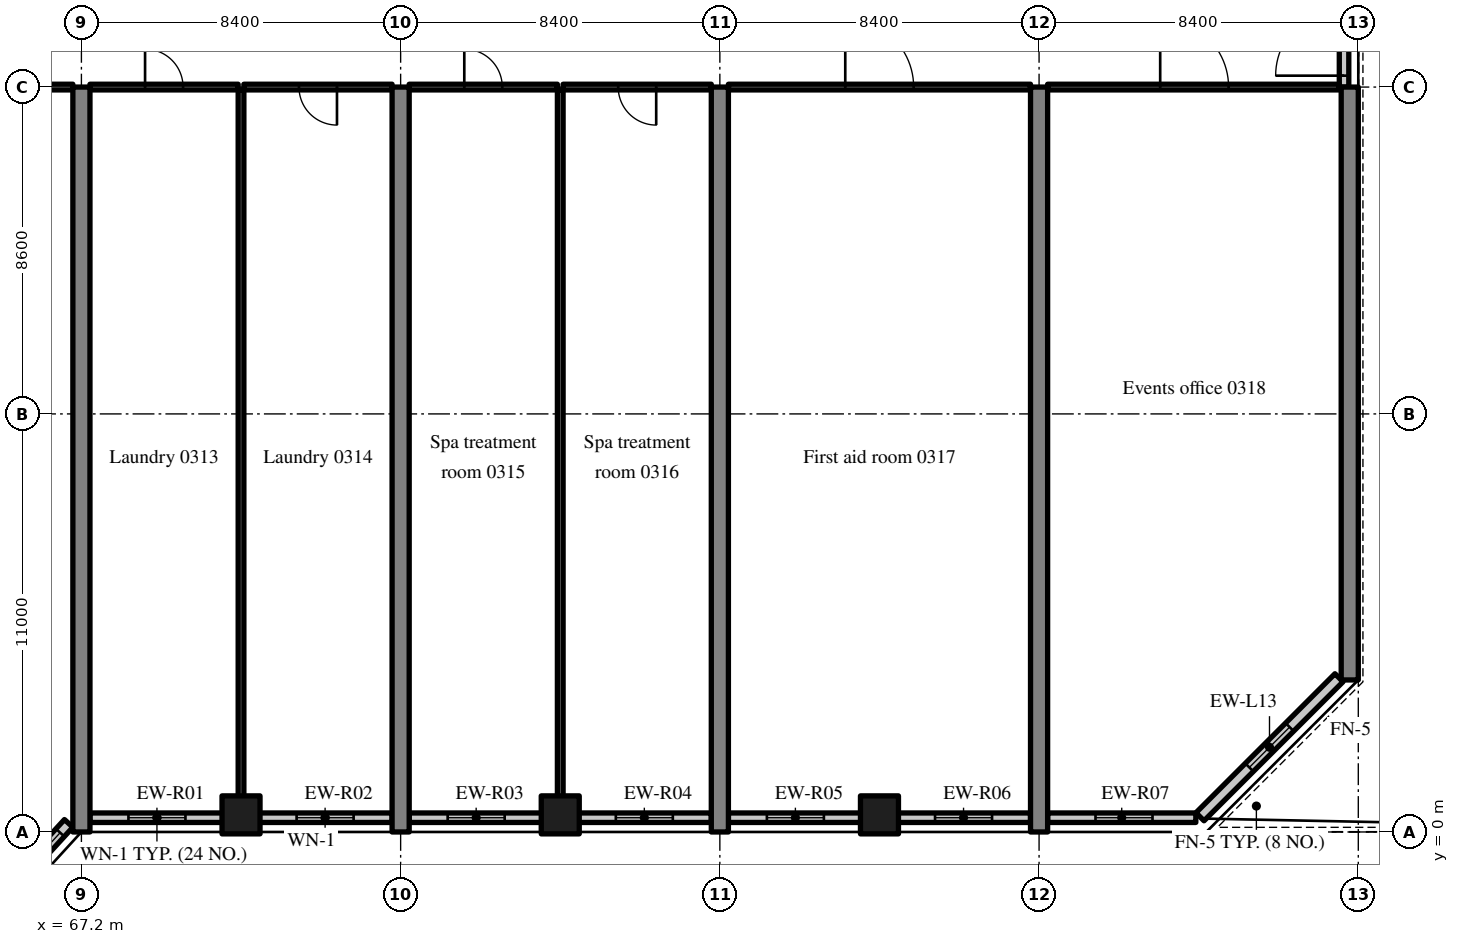
"""IFC4 building model, lengths in metres.
Left out: names, types, materials, properties, quantities, classifications, styles, units other than length and angle.
Written with IfcOpenShell. Run it as: python <this file> out.ifc"""

import sys

from ifc_helpers import new_model, si_unit, direction, frame, frame_2d, origin, origin_2d, place, context, subcontext, project, spatial, rectangle, extrude, source, transform, mapped, element, fill, save


model = new_model("IFC4")
c1 = context("Model", 3, precision=1e-05, world=origin(), true_north=direction((0.0, 1.0)))
c2 = subcontext(c1, "Body", "Model", "MODEL_VIEW")
j1 = project(units=[si_unit("LENGTHUNIT", "METRE"), si_unit("PLANEANGLEUNIT", "RADIAN")], contexts=[c1])
p1 = place(None, origin())
s1 = spatial("IfcSite", under=j1, at=p1, CompositionType="ELEMENT")
p2 = place(p1, origin())
s2 = spatial("IfcBuilding", under=s1, at=p2, CompositionType="ELEMENT")
p3 = place(p2, frame((0.0, 0.0, 18.0)))
s3 = spatial("IfcBuildingStorey", under=s2, at=p3, CompositionType="ELEMENT", Elevation=18.0)
m1 = source(origin(), c2, "Body", "SweptSolid", [
    extrude(rectangle(XDim=19.6, YDim=0.45, at=frame_2d((9.8, 0.0))), origin(), (0.0, 0.0, 1.0), 4.72),
])
for number, where, z_axis, x_axis in (
    (1, (67.2, 0.0, 0.0), (0.0, 0.0, 1.0), (0.0, 1.0, 0.0)),
    (2, (75.6, 0.0, 0.0), (0.0, 0.0, 1.0), (0.0, 1.0, 0.0)),
    (3, (84.0, 0.0, 0.0), (0.0, 0.0, 1.0), (0.0, 1.0, 0.0)),
    (4, (92.4, 0.0, 0.0), (0.0, 0.0, 1.0), (0.0, 1.0, 0.0)),
):
    element("IfcWall", number, at=place(p3, frame(where, z_axis=z_axis, x_axis=x_axis)), inside=s3, PredefinedType="SHEAR", context=c2, shape_type="MappedRepresentation", body=[
        mapped(m1, transform((0.0, 0.0, 0.0), scale=1.0)),
    ])
m2 = source(origin(), c2, "Body", "SweptSolid", [
    extrude(rectangle(XDim=15.6, YDim=0.45, at=frame_2d((7.8, 0.0))), origin(), (0.0, 0.0, 1.0), 4.72),
])
p4 = place(p3, frame((100.575, 4.0, 0.0), z_axis=(0.0, 0.0, 1.0), x_axis=(0.0, 1.0, 0.0)))
e5 = element("IfcWall", 5, at=p4, inside=s3, PredefinedType="SHEAR", context=c2, shape_type="MappedRepresentation", body=[
    mapped(m2, transform((0.0, 0.0, 0.0), scale=1.0)),
])
m3 = source(origin(), c2, "Body", "SweptSolid", [
    extrude(rectangle(XDim=1.0, YDim=1.0, at=origin_2d()), origin(), (0.0, 0.0, 1.0), 4.72),
])
for number, where, z_axis, x_axis in (
    (6, (71.4, 0.45, 0.0), (0.0, 0.0, 1.0), (1.0, 0.0, 0.0)),
    (7, (79.8, 0.45, 0.0), (0.0, 0.0, 1.0), (1.0, 0.0, 0.0)),
    (8, (88.2, 0.45, 0.0), (0.0, 0.0, 1.0), (1.0, 0.0, 0.0)),
):
    element("IfcColumn", number, at=place(p3, frame(where, z_axis=z_axis, x_axis=x_axis)), inside=s3, PredefinedType="COLUMN", context=c2, shape_type="MappedRepresentation", body=[
        mapped(m3, transform((0.0, 0.0, 0.0), scale=1.0)),
    ])
m4 = source(origin(), c2, "Body", "SweptSolid", [
    extrude(rectangle(XDim=2.162, YDim=0.3, at=frame_2d((1.081, 0.0))), origin(), (0.0, 0.0, 1.0), 4.72),
])
p5 = place(p3, frame((65.404, -1.369, 0.0), z_axis=(0.0, 0.0, 1.0), x_axis=(0.67537173084, 0.737477474355, 0.0)))
e9 = element("IfcWall", 9, at=p5, inside=s3, PredefinedType="SOLIDWALL", context=c2, shape_type="MappedRepresentation", body=[
    mapped(m4, transform((0.0, 0.0, 0.0), scale=1.0)),
])
m5 = source(origin(), c2, "Body", "SweptSolid", [
    extrude(rectangle(XDim=1.5, YDim=2.0, at=frame_2d((0.75, 1.0))), frame((0.0, 0.16, 0.0), z_axis=(0.0, -1.0, 0.0), x_axis=(1.0, 0.0, 0.0)), (0.0, 0.0, 1.0), 0.32),
])
p6 = place(p5, frame((0.331, 0.0, 0.9)))
e10 = element("IfcOpeningElement", 10, at=p6, cuts=e9, PredefinedType="OPENING", context=c2, shape_type="MappedRepresentation", body=[
    mapped(m5, transform((0.0, 0.0, 0.0), scale=1.0)),
])
m6 = source(origin(), c2, "Body", "SweptSolid", [
    extrude(rectangle(XDim=3.525, YDim=0.25, at=frame_2d((1.762, 0.0))), origin(), (0.0, 0.0, 1.0), 3.97),
])
p7 = place(p3, frame((67.425, 0.375, 0.0), z_axis=(0.0, 0.0, 1.0), x_axis=(1.0, 0.0, 0.0)))
e11 = element("IfcWall", 11, at=p7, inside=s3, PredefinedType="SOLIDWALL", context=c2, shape_type="MappedRepresentation", body=[
    mapped(m6, transform((0.0, 0.0, 0.0), scale=1.0)),
])
m7 = source(origin(), c2, "Body", "SweptSolid", [
    extrude(rectangle(XDim=1.5, YDim=1.5, at=frame_2d((0.75, 0.75))), frame((0.0, 0.135, 0.0), z_axis=(0.0, -1.0, 0.0), x_axis=(1.0, 0.0, 0.0)), (0.0, 0.0, 1.0), 0.27),
])
p8 = place(p7, frame((1.012, 0.0, 0.9)))
e12 = element("IfcOpeningElement", 12, at=p8, cuts=e11, PredefinedType="OPENING", context=c2, shape_type="MappedRepresentation", body=[
    mapped(m7, transform((0.0, 0.0, 0.0), scale=1.0)),
])
p9 = place(p3, frame((71.85, 0.375, 0.0), z_axis=(0.0, 0.0, 1.0), x_axis=(1.0, 0.0, 0.0)))
e13 = element("IfcWall", 13, at=p9, inside=s3, PredefinedType="SOLIDWALL", context=c2, shape_type="MappedRepresentation", body=[
    mapped(m6, transform((0.0, 0.0, 0.0), scale=1.0)),
])
p10 = place(p9, frame((1.012, 0.0, 0.9)))
e14 = element("IfcOpeningElement", 14, at=p10, cuts=e13, PredefinedType="OPENING", context=c2, shape_type="MappedRepresentation", body=[
    mapped(m7, transform((0.0, 0.0, 0.0), scale=1.0)),
])
m8 = source(origin(), c2, "Body", "SweptSolid", [
    extrude(rectangle(XDim=3.525, YDim=0.25, at=frame_2d((1.763, 0.0))), origin(), (0.0, 0.0, 1.0), 3.97),
])
p11 = place(p3, frame((75.825, 0.375, 0.0), z_axis=(0.0, 0.0, 1.0), x_axis=(1.0, 0.0, 0.0)))
e15 = element("IfcWall", 15, at=p11, inside=s3, PredefinedType="SOLIDWALL", context=c2, shape_type="MappedRepresentation", body=[
    mapped(m8, transform((0.0, 0.0, 0.0), scale=1.0)),
])
p12 = place(p11, frame((1.012, 0.0, 0.9)))
e16 = element("IfcOpeningElement", 16, at=p12, cuts=e15, PredefinedType="OPENING", context=c2, shape_type="MappedRepresentation", body=[
    mapped(m7, transform((0.0, 0.0, 0.0), scale=1.0)),
])
p13 = place(p3, frame((80.25, 0.375, 0.0), z_axis=(0.0, 0.0, 1.0), x_axis=(1.0, 0.0, 0.0)))
e17 = element("IfcWall", 17, at=p13, inside=s3, PredefinedType="SOLIDWALL", context=c2, shape_type="MappedRepresentation", body=[
    mapped(m6, transform((0.0, 0.0, 0.0), scale=1.0)),
])
p14 = place(p13, frame((1.012, 0.0, 0.9)))
e18 = element("IfcOpeningElement", 18, at=p14, cuts=e17, PredefinedType="OPENING", context=c2, shape_type="MappedRepresentation", body=[
    mapped(m7, transform((0.0, 0.0, 0.0), scale=1.0)),
])
p15 = place(p3, frame((84.225, 0.375, 0.0), z_axis=(0.0, 0.0, 1.0), x_axis=(1.0, 0.0, 0.0)))
e19 = element("IfcWall", 19, at=p15, inside=s3, PredefinedType="SOLIDWALL", context=c2, shape_type="MappedRepresentation", body=[
    mapped(m6, transform((0.0, 0.0, 0.0), scale=1.0)),
])
p16 = place(p15, frame((1.012, 0.0, 0.9)))
e20 = element("IfcOpeningElement", 20, at=p16, cuts=e19, PredefinedType="OPENING", context=c2, shape_type="MappedRepresentation", body=[
    mapped(m7, transform((0.0, 0.0, 0.0), scale=1.0)),
])
p17 = place(p3, frame((88.65, 0.375, 0.0), z_axis=(0.0, 0.0, 1.0), x_axis=(1.0, 0.0, 0.0)))
e21 = element("IfcWall", 21, at=p17, inside=s3, PredefinedType="SOLIDWALL", context=c2, shape_type="MappedRepresentation", body=[
    mapped(m8, transform((0.0, 0.0, 0.0), scale=1.0)),
])
p18 = place(p17, frame((1.012, 0.0, 0.9)))
e22 = element("IfcOpeningElement", 22, at=p18, cuts=e21, PredefinedType="OPENING", context=c2, shape_type="MappedRepresentation", body=[
    mapped(m7, transform((0.0, 0.0, 0.0), scale=1.0)),
])
m9 = source(origin(), c2, "Body", "SweptSolid", [
    extrude(rectangle(XDim=3.9, YDim=0.25, at=frame_2d((1.95, 0.0))), origin(), (0.0, 0.0, 1.0), 3.97),
])
p19 = place(p3, frame((92.625, 0.375, 0.0), z_axis=(0.0, 0.0, 1.0), x_axis=(1.0, 0.0, 0.0)))
e23 = element("IfcWall", 23, at=p19, inside=s3, PredefinedType="SOLIDWALL", context=c2, shape_type="MappedRepresentation", body=[
    mapped(m9, transform((0.0, 0.0, 0.0), scale=1.0)),
])
p20 = place(p19, frame((1.26, 0.0, 0.9)))
e24 = element("IfcOpeningElement", 24, at=p20, cuts=e23, PredefinedType="OPENING", context=c2, shape_type="MappedRepresentation", body=[
    mapped(m7, transform((0.0, 0.0, 0.0), scale=1.0)),
])
m10 = source(origin(), c2, "Body", "SweptSolid", [
    extrude(rectangle(XDim=5.173, YDim=0.3, at=frame_2d((2.586, 0.0))), origin(), (0.0, 0.0, 1.0), 3.97),
])
p21 = place(p3, frame((96.634, 0.4, 0.0), z_axis=(0.0, 0.0, 1.0), x_axis=(0.707106781187, 0.707106781187, 0.0)))
e25 = element("IfcWall", 25, at=p21, inside=s3, PredefinedType="SOLIDWALL", context=c2, shape_type="MappedRepresentation", body=[
    mapped(m10, transform((0.0, 0.0, 0.0), scale=1.0)),
])
m11 = source(origin(), c2, "Body", "SweptSolid", [
    extrude(rectangle(XDim=1.5, YDim=1.5, at=frame_2d((0.75, 0.75))), frame((0.0, 0.16, 0.0), z_axis=(0.0, -1.0, 0.0), x_axis=(1.0, 0.0, 0.0)), (0.0, 0.0, 1.0), 0.32),
])
p22 = place(p21, frame((1.836, 0.0, 0.9)))
e26 = element("IfcOpeningElement", 26, at=p22, cuts=e25, PredefinedType="OPENING", context=c2, shape_type="MappedRepresentation", body=[
    mapped(m11, transform((0.0, 0.0, 0.0), scale=1.0)),
])
m12 = source(origin(), c2, "Body", "SweptSolid", [
    extrude(rectangle(XDim=2.4, YDim=0.25, at=frame_2d((1.2, 0.0))), origin(), (0.0, 0.0, 1.0), 3.82),
])
p23 = place(p3, frame((100.425, 19.6, 0.0), z_axis=(0.0, 0.0, 1.0), x_axis=(0.0, 1.0, 0.0)))
e27 = element("IfcWall", 27, at=p23, inside=s3, PredefinedType="SOLIDWALL", context=c2, shape_type="MappedRepresentation", body=[
    mapped(m12, transform((0.0, 0.0, 0.0), scale=1.0)),
])
m13 = source(origin(), c2, "Body", "SweptSolid", [
    extrude(rectangle(XDim=1.8, YDim=2.4, at=frame_2d((0.9, 1.2))), frame((0.0, 0.135, 0.0), z_axis=(0.0, -1.0, 0.0), x_axis=(1.0, 0.0, 0.0)), (0.0, 0.0, 1.0), 0.27),
])
p24 = place(p23, frame((0.3, 0.0, 0.0)))
e28 = element("IfcOpeningElement", 28, at=p24, cuts=e27, PredefinedType="OPENING", context=c2, shape_type="MappedRepresentation", body=[
    mapped(m13, transform((0.0, 0.0, 0.0), scale=1.0)),
])
m14 = source(origin(), c2, "Body", "SweptSolid", [
    extrude(rectangle(XDim=7.95, YDim=0.15, at=frame_2d((3.975, 0.0))), origin(), (0.0, 0.0, 1.0), 4.02),
])
p25 = place(p3, frame((59.025, 19.6, 0.0), z_axis=(0.0, 0.0, 1.0), x_axis=(1.0, 0.0, 0.0)))
e29 = element("IfcWall", 29, at=p25, inside=s3, PredefinedType="PARTITIONING", context=c2, shape_type="MappedRepresentation", body=[
    mapped(m14, transform((0.0, 0.0, 0.0), scale=1.0)),
])
m15 = source(origin(), c2, "Body", "SweptSolid", [
    extrude(rectangle(XDim=1.8, YDim=2.1, at=frame_2d((0.9, 1.05))), frame((0.0, 0.085, 0.0), z_axis=(0.0, -1.0, 0.0), x_axis=(1.0, 0.0, 0.0)), (0.0, 0.0, 1.0), 0.17),
])
p26 = place(p25, frame((3.075, 0.0, 0.0)))
e30 = element("IfcOpeningElement", 30, at=p26, cuts=e29, PredefinedType="OPENING", context=c2, shape_type="MappedRepresentation", body=[
    mapped(m15, transform((0.0, 0.0, 0.0), scale=1.0)),
])
m16 = source(origin(), c2, "Body", "SweptSolid", [
    extrude(rectangle(XDim=3.9, YDim=0.15, at=frame_2d((1.95, 0.0))), origin(), (0.0, 0.0, 1.0), 4.02),
])
p27 = place(p3, frame((67.425, 19.6, 0.0), z_axis=(0.0, 0.0, 1.0), x_axis=(1.0, 0.0, 0.0)))
e31 = element("IfcWall", 31, at=p27, inside=s3, PredefinedType="PARTITIONING", context=c2, shape_type="MappedRepresentation", body=[
    mapped(m16, transform((0.0, 0.0, 0.0), scale=1.0)),
])
m17 = source(origin(), c2, "Body", "SweptSolid", [
    extrude(rectangle(XDim=1.0, YDim=2.1, at=frame_2d((0.5, 1.05))), frame((0.0, 0.085, 0.0), z_axis=(0.0, -1.0, 0.0), x_axis=(1.0, 0.0, 0.0)), (0.0, 0.0, 1.0), 0.17),
])
p28 = place(p27, frame((1.45, 0.0, 0.0)))
e32 = element("IfcOpeningElement", 32, at=p28, cuts=e31, PredefinedType="OPENING", context=c2, shape_type="MappedRepresentation", body=[
    mapped(m17, transform((0.0, 0.0, 0.0), scale=1.0)),
])
p29 = place(p3, frame((71.475, 19.6, 0.0), z_axis=(0.0, 0.0, 1.0), x_axis=(1.0, 0.0, 0.0)))
e33 = element("IfcWall", 33, at=p29, inside=s3, PredefinedType="PARTITIONING", context=c2, shape_type="MappedRepresentation", body=[
    mapped(m16, transform((0.0, 0.0, 0.0), scale=1.0)),
])
p30 = place(p29, frame((1.45, 0.0, 0.0)))
e34 = element("IfcOpeningElement", 34, at=p30, cuts=e33, PredefinedType="OPENING", context=c2, shape_type="MappedRepresentation", body=[
    mapped(m17, transform((0.0, 0.0, 0.0), scale=1.0)),
])
m18 = source(origin(), c2, "Body", "SweptSolid", [
    extrude(rectangle(XDim=18.625, YDim=0.15, at=frame_2d((9.312, 0.0))), origin(), (0.0, 0.0, 1.0), 4.72),
])
p31 = place(p3, frame((71.4, 0.9, 0.0), z_axis=(0.0, 0.0, 1.0), x_axis=(0.0, 1.0, 0.0)))
e35 = element("IfcWall", 35, at=p31, inside=s3, PredefinedType="PARTITIONING", context=c2, shape_type="MappedRepresentation", body=[
    mapped(m18, transform((0.0, 0.0, 0.0), scale=1.0)),
])
m19 = source(origin(), c2, "Body", "SweptSolid", [
    extrude(rectangle(XDim=3.9, YDim=0.15, at=frame_2d((1.95, 0.0))), origin(), (0.0, 0.0, 1.0), 4.02),
])
p32 = place(p3, frame((75.825, 19.6, 0.0), z_axis=(0.0, 0.0, 1.0), x_axis=(1.0, 0.0, 0.0)))
e36 = element("IfcWall", 36, at=p32, inside=s3, PredefinedType="PARTITIONING", context=c2, shape_type="MappedRepresentation", body=[
    mapped(m19, transform((0.0, 0.0, 0.0), scale=1.0)),
])
p33 = place(p32, frame((1.45, 0.0, 0.0)))
e37 = element("IfcOpeningElement", 37, at=p33, cuts=e36, PredefinedType="OPENING", context=c2, shape_type="MappedRepresentation", body=[
    mapped(m17, transform((0.0, 0.0, 0.0), scale=1.0)),
])
p34 = place(p3, frame((79.875, 19.6, 0.0), z_axis=(0.0, 0.0, 1.0), x_axis=(1.0, 0.0, 0.0)))
e38 = element("IfcWall", 38, at=p34, inside=s3, PredefinedType="PARTITIONING", context=c2, shape_type="MappedRepresentation", body=[
    mapped(m16, transform((0.0, 0.0, 0.0), scale=1.0)),
])
p35 = place(p34, frame((1.45, 0.0, 0.0)))
e39 = element("IfcOpeningElement", 39, at=p35, cuts=e38, PredefinedType="OPENING", context=c2, shape_type="MappedRepresentation", body=[
    mapped(m17, transform((0.0, 0.0, 0.0), scale=1.0)),
])
p36 = place(p3, frame((79.8, 0.9, 0.0), z_axis=(0.0, 0.0, 1.0), x_axis=(0.0, 1.0, 0.0)))
e40 = element("IfcWall", 40, at=p36, inside=s3, PredefinedType="PARTITIONING", context=c2, shape_type="MappedRepresentation", body=[
    mapped(m18, transform((0.0, 0.0, 0.0), scale=1.0)),
])
m20 = source(origin(), c2, "Body", "SweptSolid", [
    extrude(rectangle(XDim=7.95, YDim=0.15, at=frame_2d((3.975, 0.0))), origin(), (0.0, 0.0, 1.0), 4.02),
])
p37 = place(p3, frame((84.225, 19.6, 0.0), z_axis=(0.0, 0.0, 1.0), x_axis=(1.0, 0.0, 0.0)))
e41 = element("IfcWall", 41, at=p37, inside=s3, PredefinedType="PARTITIONING", context=c2, shape_type="MappedRepresentation", body=[
    mapped(m20, transform((0.0, 0.0, 0.0), scale=1.0)),
])
p38 = place(p37, frame((3.075, 0.0, 0.0)))
e42 = element("IfcOpeningElement", 42, at=p38, cuts=e41, PredefinedType="OPENING", context=c2, shape_type="MappedRepresentation", body=[
    mapped(m15, transform((0.0, 0.0, 0.0), scale=1.0)),
])
m21 = source(origin(), c2, "Body", "SweptSolid", [
    extrude(rectangle(XDim=7.675, YDim=0.15, at=frame_2d((3.837, 0.0))), origin(), (0.0, 0.0, 1.0), 4.02),
])
p39 = place(p3, frame((92.625, 19.6, 0.0), z_axis=(0.0, 0.0, 1.0), x_axis=(1.0, 0.0, 0.0)))
e43 = element("IfcWall", 43, at=p39, inside=s3, PredefinedType="PARTITIONING", context=c2, shape_type="MappedRepresentation", body=[
    mapped(m21, transform((0.0, 0.0, 0.0), scale=1.0)),
])
p40 = place(p39, frame((2.962, 0.0, 0.0)))
e44 = element("IfcOpeningElement", 44, at=p40, cuts=e43, PredefinedType="OPENING", context=c2, shape_type="MappedRepresentation", body=[
    mapped(m15, transform((0.0, 0.0, 0.0), scale=1.0)),
])
m22 = source(origin(), c2, "Body", "SweptSolid", [
    extrude(rectangle(XDim=1.5, YDim=2.0, at=frame_2d((0.75, 1.0))), frame((0.0, 0.03, 0.0), z_axis=(0.0, -1.0, 0.0), x_axis=(1.0, 0.0, 0.0)), (0.0, 0.0, 1.0), 0.06),
])
p41 = place(p6, origin())
e45 = element("IfcWindow", 45, at=p41, inside=s3, PartitioningType="SINGLE_PANEL", PredefinedType="WINDOW", context=c2, shape_type="MappedRepresentation", body=[
    mapped(m22, transform((0.0, 0.0, 0.0), scale=1.0)),
])
fill(e10, e45)
m23 = source(origin(), c2, "Body", "SweptSolid", [
    extrude(rectangle(XDim=1.5, YDim=1.5, at=frame_2d((0.75, 0.75))), frame((0.0, 0.03, 0.0), z_axis=(0.0, -1.0, 0.0), x_axis=(1.0, 0.0, 0.0)), (0.0, 0.0, 1.0), 0.06),
])
p42 = place(p8, origin())
e46 = element("IfcWindow", 46, at=p42, inside=s3, PartitioningType="SINGLE_PANEL", PredefinedType="WINDOW", context=c2, shape_type="MappedRepresentation", body=[
    mapped(m23, transform((0.0, 0.0, 0.0), scale=1.0)),
])
fill(e12, e46)
p43 = place(p10, origin())
e47 = element("IfcWindow", 47, at=p43, inside=s3, PartitioningType="SINGLE_PANEL", PredefinedType="WINDOW", context=c2, shape_type="MappedRepresentation", body=[
    mapped(m23, transform((0.0, 0.0, 0.0), scale=1.0)),
])
fill(e14, e47)
p44 = place(p12, origin())
e48 = element("IfcWindow", 48, at=p44, inside=s3, PartitioningType="SINGLE_PANEL", PredefinedType="WINDOW", context=c2, shape_type="MappedRepresentation", body=[
    mapped(m23, transform((0.0, 0.0, 0.0), scale=1.0)),
])
fill(e16, e48)
p45 = place(p14, origin())
e49 = element("IfcWindow", 49, at=p45, inside=s3, PartitioningType="SINGLE_PANEL", PredefinedType="WINDOW", context=c2, shape_type="MappedRepresentation", body=[
    mapped(m23, transform((0.0, 0.0, 0.0), scale=1.0)),
])
fill(e18, e49)
p46 = place(p16, origin())
e50 = element("IfcWindow", 50, at=p46, inside=s3, PartitioningType="SINGLE_PANEL", PredefinedType="WINDOW", context=c2, shape_type="MappedRepresentation", body=[
    mapped(m23, transform((0.0, 0.0, 0.0), scale=1.0)),
])
fill(e20, e50)
p47 = place(p18, origin())
e51 = element("IfcWindow", 51, at=p47, inside=s3, PartitioningType="SINGLE_PANEL", PredefinedType="WINDOW", context=c2, shape_type="MappedRepresentation", body=[
    mapped(m23, transform((0.0, 0.0, 0.0), scale=1.0)),
])
fill(e22, e51)
p48 = place(p20, origin())
e52 = element("IfcWindow", 52, at=p48, inside=s3, PartitioningType="SINGLE_PANEL", PredefinedType="WINDOW", context=c2, shape_type="MappedRepresentation", body=[
    mapped(m23, transform((0.0, 0.0, 0.0), scale=1.0)),
])
fill(e24, e52)
p49 = place(p22, origin())
e53 = element("IfcWindow", 53, at=p49, inside=s3, PartitioningType="SINGLE_PANEL", PredefinedType="WINDOW", context=c2, shape_type="MappedRepresentation", body=[
    mapped(m23, transform((0.0, 0.0, 0.0), scale=1.0)),
])
fill(e26, e53)
m24 = source(origin(), c2, "Body", "SweptSolid", [
    extrude(rectangle(XDim=1.8, YDim=2.4, at=frame_2d((0.9, 1.2))), frame((0.0, 0.025, 0.0), z_axis=(0.0, -1.0, 0.0), x_axis=(1.0, 0.0, 0.0)), (0.0, 0.0, 1.0), 0.05),
])
p50 = place(p24, origin())
e54 = element("IfcDoor", 54, at=p50, inside=s3, OperationType="DOUBLE_DOOR_SINGLE_SWING", PredefinedType="DOOR", context=c2, shape_type="MappedRepresentation", body=[
    mapped(m24, transform((0.0, 0.0, 0.0), scale=1.0)),
])
fill(e28, e54)
m25 = source(origin(), c2, "Body", "SweptSolid", [
    extrude(rectangle(XDim=1.0, YDim=2.1, at=frame_2d((0.5, 1.05))), frame((0.0, 0.025, 0.0), z_axis=(0.0, -1.0, 0.0), x_axis=(1.0, 0.0, 0.0)), (0.0, 0.0, 1.0), 0.05),
])
p51 = place(p28, origin())
e55 = element("IfcDoor", 55, at=p51, inside=s3, OperationType="SINGLE_SWING_LEFT", PredefinedType="DOOR", context=c2, shape_type="MappedRepresentation", body=[
    mapped(m25, transform((0.0, 0.0, 0.0), scale=1.0)),
])
fill(e32, e55)
p52 = place(p30, origin())
e56 = element("IfcDoor", 56, at=p52, inside=s3, OperationType="SINGLE_SWING_RIGHT", PredefinedType="DOOR", context=c2, shape_type="MappedRepresentation", body=[
    mapped(m25, transform((0.0, 0.0, 0.0), scale=1.0)),
])
fill(e34, e56)
p53 = place(p33, origin())
e57 = element("IfcDoor", 57, at=p53, inside=s3, OperationType="SINGLE_SWING_LEFT", PredefinedType="DOOR", context=c2, shape_type="MappedRepresentation", body=[
    mapped(m25, transform((0.0, 0.0, 0.0), scale=1.0)),
])
fill(e37, e57)
p54 = place(p35, origin())
e58 = element("IfcDoor", 58, at=p54, inside=s3, OperationType="SINGLE_SWING_RIGHT", PredefinedType="DOOR", context=c2, shape_type="MappedRepresentation", body=[
    mapped(m25, transform((0.0, 0.0, 0.0), scale=1.0)),
])
fill(e39, e58)
m26 = source(origin(), c2, "Body", "SweptSolid", [
    extrude(rectangle(XDim=1.8, YDim=2.1, at=frame_2d((0.9, 1.05))), frame((0.0, 0.025, 0.0), z_axis=(0.0, -1.0, 0.0), x_axis=(1.0, 0.0, 0.0)), (0.0, 0.0, 1.0), 0.05),
])
p55 = place(p38, origin())
e59 = element("IfcDoor", 59, at=p55, inside=s3, OperationType="DOUBLE_DOOR_SINGLE_SWING", PredefinedType="DOOR", context=c2, shape_type="MappedRepresentation", body=[
    mapped(m26, transform((0.0, 0.0, 0.0), scale=1.0)),
])
fill(e42, e59)
p56 = place(p40, origin())
e60 = element("IfcDoor", 60, at=p56, inside=s3, OperationType="DOUBLE_DOOR_SINGLE_SWING", PredefinedType="DOOR", context=c2, shape_type="MappedRepresentation", body=[
    mapped(m26, transform((0.0, 0.0, 0.0), scale=1.0)),
])
fill(e44, e60)
save(model, sys.argv[1])
